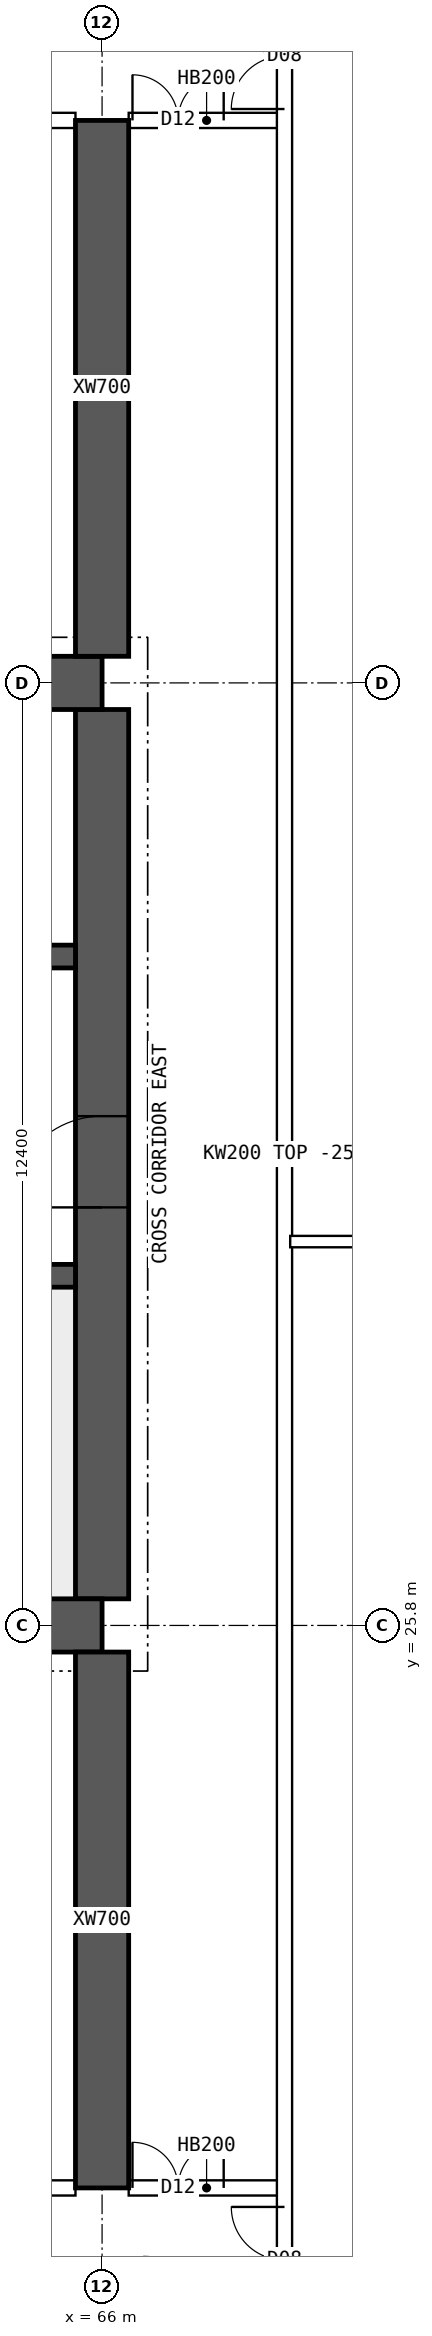
"""IFC4 building model, lengths in metres.
Left out: names, types, materials, properties, quantities, classifications, styles, units other than length and angle.
Written with IfcOpenShell. Run it as: python <this file> out.ifc"""

import sys

from ifc_helpers import new_model, si_unit, direction, frame, frame_2d, origin, place, context, subcontext, project, spatial, polyline, rectangle, outline, extrude, element, fill, save


model = new_model("IFC4")
c1 = context("Model", 3, precision=1e-05, world=origin(), true_north=direction((0.0, 1.0)))
c2 = subcontext(c1, "Body", "Model", "MODEL_VIEW")
j1 = project(units=[si_unit("LENGTHUNIT", "METRE"), si_unit("PLANEANGLEUNIT", "RADIAN")], contexts=[c1])
p1 = place(None, origin())
s1 = spatial("IfcSite", under=j1, at=p1, CompositionType="ELEMENT")
p2 = place(p1, origin())
s2 = spatial("IfcBuilding", under=s1, at=p2, CompositionType="ELEMENT")
p3 = place(p2, frame((0.0, 0.0, 246.55)))
s3 = spatial("IfcBuildingStorey", under=s2, at=p3, CompositionType="ELEMENT", Elevation=246.55)
for number, where, z_axis, x_axis in (
    (1, (18.0, 25.8, 0.0), (0.0, 0.0, 1.0), (1.0, 0.0, 0.0)),
    (2, (18.0, 38.2, 0.0), (0.0, 0.0, 1.0), (1.0, 0.0, 0.0)),
):
    element("IfcWall", number, at=place(p3, frame(where, z_axis=z_axis, x_axis=x_axis)), inside=s3, PredefinedType="SHEAR", context=c2, shape_type="SweptSolid", body=[
        extrude(rectangle(XDim=48.0, YDim=0.7, at=frame_2d((24.0, 0.0))), origin(), (0.0, 0.0, 1.0), 3.75),
    ])
p4 = place(p3, frame((66.0, 26.15, 0.0), z_axis=(0.0, 0.0, 1.0), x_axis=(0.0, 1.0, 0.0)))
e3 = element("IfcWall", 3, at=p4, inside=s3, PredefinedType="SHEAR", context=c2, shape_type="SweptSolid", body=[
    extrude(rectangle(XDim=11.7, YDim=0.7, at=frame_2d((5.85, 0.0))), origin(), (0.0, 0.0, 1.0), 3.75),
])
p5 = place(p4, frame((5.15, 0.0, 0.0)))
e4 = element("IfcOpeningElement", 4, at=p5, cuts=e3, PredefinedType="OPENING", context=c2, shape_type="SweptSolid", body=[
    extrude(rectangle(XDim=1.2, YDim=2.1, at=frame_2d((0.6, 1.05))), frame((0.0, 0.36, 0.0), z_axis=(0.0, -1.0, 0.0), x_axis=(1.0, 0.0, 0.0)), (0.0, 0.0, 1.0), 0.72),
])
p6 = place(p3, frame((18.35, 30.4, 0.0), z_axis=(0.0, 0.0, 1.0), x_axis=(1.0, 0.0, 0.0)))
e5 = element("IfcWall", 5, at=p6, inside=s3, PredefinedType="SHEAR", context=c2, shape_type="SweptSolid", body=[
    extrude(rectangle(XDim=47.3, YDim=0.3, at=frame_2d((23.65, 0.0))), origin(), (0.0, 0.0, 1.0), 3.75),
])
p7 = place(p6, frame((0.4, 0.0, 0.0)))
e6 = element("IfcOpeningElement", 6, at=p7, cuts=e5, PredefinedType="OPENING", context=c2, shape_type="SweptSolid", body=[
    extrude(rectangle(XDim=1.0, YDim=2.1, at=frame_2d((0.5, 1.05))), frame((0.0, 0.16, 0.0), z_axis=(0.0, -1.0, 0.0), x_axis=(1.0, 0.0, 0.0)), (0.0, 0.0, 1.0), 0.32),
])
p8 = place(p6, frame((45.9, 0.0, 0.0)))
e7 = element("IfcOpeningElement", 7, at=p8, cuts=e5, PredefinedType="OPENING", context=c2, shape_type="SweptSolid", body=[
    extrude(rectangle(XDim=1.0, YDim=2.1, at=frame_2d((0.5, 1.05))), frame((0.0, 0.16, 0.0), z_axis=(0.0, -1.0, 0.0), x_axis=(1.0, 0.0, 0.0)), (0.0, 0.0, 1.0), 0.32),
])
p9 = place(p6, frame((8.4, 0.0, 0.0)))
e8 = element("IfcOpeningElement", 8, at=p9, cuts=e5, PredefinedType="OPENING", context=c2, shape_type="SweptSolid", body=[
    extrude(rectangle(XDim=1.1, YDim=2.1, at=frame_2d((0.55, 1.05))), frame((0.0, 0.16, 0.0), z_axis=(0.0, -1.0, 0.0), x_axis=(1.0, 0.0, 0.0)), (0.0, 0.0, 1.0), 0.32),
])
p10 = place(p6, frame((11.0, 0.0, 0.0)))
e9 = element("IfcOpeningElement", 9, at=p10, cuts=e5, PredefinedType="OPENING", context=c2, shape_type="SweptSolid", body=[
    extrude(rectangle(XDim=1.1, YDim=2.1, at=frame_2d((0.55, 1.05))), frame((0.0, 0.16, 0.0), z_axis=(0.0, -1.0, 0.0), x_axis=(1.0, 0.0, 0.0)), (0.0, 0.0, 1.0), 0.32),
])
p11 = place(p6, frame((13.6, 0.0, 0.0)))
e10 = element("IfcOpeningElement", 10, at=p11, cuts=e5, PredefinedType="OPENING", context=c2, shape_type="SweptSolid", body=[
    extrude(rectangle(XDim=1.1, YDim=2.1, at=frame_2d((0.55, 1.05))), frame((0.0, 0.16, 0.0), z_axis=(0.0, -1.0, 0.0), x_axis=(1.0, 0.0, 0.0)), (0.0, 0.0, 1.0), 0.32),
])
p12 = place(p6, frame((16.2, 0.0, 0.0)))
e11 = element("IfcOpeningElement", 11, at=p12, cuts=e5, PredefinedType="OPENING", context=c2, shape_type="SweptSolid", body=[
    extrude(rectangle(XDim=1.1, YDim=2.1, at=frame_2d((0.55, 1.05))), frame((0.0, 0.16, 0.0), z_axis=(0.0, -1.0, 0.0), x_axis=(1.0, 0.0, 0.0)), (0.0, 0.0, 1.0), 0.32),
])
p13 = place(p6, frame((18.975, 0.0, 0.0)))
e12 = element("IfcOpeningElement", 12, at=p13, cuts=e5, PredefinedType="OPENING", context=c2, shape_type="SweptSolid", body=[
    extrude(rectangle(XDim=0.9, YDim=2.1, at=frame_2d((0.45, 1.05))), frame((0.0, 0.16, 0.0), z_axis=(0.0, -1.0, 0.0), x_axis=(1.0, 0.0, 0.0)), (0.0, 0.0, 1.0), 0.32),
])
p14 = place(p6, frame((24.475, 0.0, 0.0)))
e13 = element("IfcOpeningElement", 13, at=p14, cuts=e5, PredefinedType="OPENING", context=c2, shape_type="SweptSolid", body=[
    extrude(rectangle(XDim=0.9, YDim=2.1, at=frame_2d((0.45, 1.05))), frame((0.0, 0.16, 0.0), z_axis=(0.0, -1.0, 0.0), x_axis=(1.0, 0.0, 0.0)), (0.0, 0.0, 1.0), 0.32),
])
p15 = place(p6, frame((30.267, 0.0, 0.0)))
e14 = element("IfcOpeningElement", 14, at=p15, cuts=e5, PredefinedType="OPENING", context=c2, shape_type="SweptSolid", body=[
    extrude(rectangle(XDim=1.1, YDim=2.1, at=frame_2d((0.55, 1.05))), frame((0.0, 0.16, 0.0), z_axis=(0.0, -1.0, 0.0), x_axis=(1.0, 0.0, 0.0)), (0.0, 0.0, 1.0), 0.32),
])
p16 = place(p6, frame((33.8, 0.0, 0.0)))
e15 = element("IfcOpeningElement", 15, at=p16, cuts=e5, PredefinedType="OPENING", context=c2, shape_type="SweptSolid", body=[
    extrude(rectangle(XDim=1.1, YDim=2.1, at=frame_2d((0.55, 1.05))), frame((0.0, 0.16, 0.0), z_axis=(0.0, -1.0, 0.0), x_axis=(1.0, 0.0, 0.0)), (0.0, 0.0, 1.0), 0.32),
])
p17 = place(p6, frame((37.333, 0.0, 0.0)))
e16 = element("IfcOpeningElement", 16, at=p17, cuts=e5, PredefinedType="OPENING", context=c2, shape_type="SweptSolid", body=[
    extrude(rectangle(XDim=1.1, YDim=2.1, at=frame_2d((0.55, 1.05))), frame((0.0, 0.16, 0.0), z_axis=(0.0, -1.0, 0.0), x_axis=(1.0, 0.0, 0.0)), (0.0, 0.0, 1.0), 0.32),
])
p18 = place(p3, frame((18.35, 34.6, 0.0), z_axis=(0.0, 0.0, 1.0), x_axis=(1.0, 0.0, 0.0)))
e17 = element("IfcWall", 17, at=p18, inside=s3, PredefinedType="SHEAR", context=c2, shape_type="SweptSolid", body=[
    extrude(rectangle(XDim=47.3, YDim=0.3, at=frame_2d((23.65, 0.0))), origin(), (0.0, 0.0, 1.0), 3.75),
])
p19 = place(p18, frame((0.9, 0.0, 0.0)))
e18 = element("IfcOpeningElement", 18, at=p19, cuts=e17, PredefinedType="OPENING", context=c2, shape_type="SweptSolid", body=[
    extrude(rectangle(XDim=1.1, YDim=2.1, at=frame_2d((0.55, 1.05))), frame((0.0, 0.16, 0.0), z_axis=(0.0, -1.0, 0.0), x_axis=(1.0, 0.0, 0.0)), (0.0, 0.0, 1.0), 0.32),
])
p20 = place(p18, frame((45.3, 0.0, 0.0)))
e19 = element("IfcOpeningElement", 19, at=p20, cuts=e17, PredefinedType="OPENING", context=c2, shape_type="SweptSolid", body=[
    extrude(rectangle(XDim=1.1, YDim=2.1, at=frame_2d((0.55, 1.05))), frame((0.0, 0.16, 0.0), z_axis=(0.0, -1.0, 0.0), x_axis=(1.0, 0.0, 0.0)), (0.0, 0.0, 1.0), 0.32),
])
p21 = place(p18, frame((4.25, 0.0, 0.0)))
e20 = element("IfcOpeningElement", 20, at=p21, cuts=e17, PredefinedType="OPENING", context=c2, shape_type="SweptSolid", body=[
    extrude(rectangle(XDim=0.9, YDim=2.1, at=frame_2d((0.45, 1.05))), frame((0.0, 0.16, 0.0), z_axis=(0.0, -1.0, 0.0), x_axis=(1.0, 0.0, 0.0)), (0.0, 0.0, 1.0), 0.32),
])
p22 = place(p18, frame((42.15, 0.0, 0.0)))
e21 = element("IfcOpeningElement", 21, at=p22, cuts=e17, PredefinedType="OPENING", context=c2, shape_type="SweptSolid", body=[
    extrude(rectangle(XDim=0.9, YDim=2.1, at=frame_2d((0.45, 1.05))), frame((0.0, 0.16, 0.0), z_axis=(0.0, -1.0, 0.0), x_axis=(1.0, 0.0, 0.0)), (0.0, 0.0, 1.0), 0.32),
])
p23 = place(p18, frame((9.025, 0.0, 0.0)))
e22 = element("IfcOpeningElement", 22, at=p23, cuts=e17, PredefinedType="OPENING", context=c2, shape_type="SweptSolid", body=[
    extrude(rectangle(XDim=0.9, YDim=2.1, at=frame_2d((0.45, 1.05))), frame((0.0, 0.16, 0.0), z_axis=(0.0, -1.0, 0.0), x_axis=(1.0, 0.0, 0.0)), (0.0, 0.0, 1.0), 0.32),
])
p24 = place(p18, frame((12.999, 0.0, 0.0)))
e23 = element("IfcOpeningElement", 23, at=p24, cuts=e17, PredefinedType="OPENING", context=c2, shape_type="SweptSolid", body=[
    extrude(rectangle(XDim=0.9, YDim=2.1, at=frame_2d((0.45, 1.05))), frame((0.0, 0.16, 0.0), z_axis=(0.0, -1.0, 0.0), x_axis=(1.0, 0.0, 0.0)), (0.0, 0.0, 1.0), 0.32),
])
p25 = place(p18, frame((16.646, 0.0, 0.0)))
e24 = element("IfcOpeningElement", 24, at=p25, cuts=e17, PredefinedType="OPENING", context=c2, shape_type="SweptSolid", body=[
    extrude(rectangle(XDim=0.9, YDim=2.1, at=frame_2d((0.45, 1.05))), frame((0.0, 0.16, 0.0), z_axis=(0.0, -1.0, 0.0), x_axis=(1.0, 0.0, 0.0)), (0.0, 0.0, 1.0), 0.32),
])
p26 = place(p18, frame((20.405, 0.0, 0.0)))
e25 = element("IfcOpeningElement", 25, at=p26, cuts=e17, PredefinedType="OPENING", context=c2, shape_type="SweptSolid", body=[
    extrude(rectangle(XDim=0.9, YDim=2.1, at=frame_2d((0.45, 1.05))), frame((0.0, 0.16, 0.0), z_axis=(0.0, -1.0, 0.0), x_axis=(1.0, 0.0, 0.0)), (0.0, 0.0, 1.0), 0.32),
])
p27 = place(p18, frame((24.811, 0.0, 0.0)))
e26 = element("IfcOpeningElement", 26, at=p27, cuts=e17, PredefinedType="OPENING", context=c2, shape_type="SweptSolid", body=[
    extrude(rectangle(XDim=0.9, YDim=2.1, at=frame_2d((0.45, 1.05))), frame((0.0, 0.16, 0.0), z_axis=(0.0, -1.0, 0.0), x_axis=(1.0, 0.0, 0.0)), (0.0, 0.0, 1.0), 0.32),
])
p28 = place(p18, frame((27.608, 0.0, 0.0)))
e27 = element("IfcOpeningElement", 27, at=p28, cuts=e17, PredefinedType="OPENING", context=c2, shape_type="SweptSolid", body=[
    extrude(rectangle(XDim=0.9, YDim=2.1, at=frame_2d((0.45, 1.05))), frame((0.0, 0.16, 0.0), z_axis=(0.0, -1.0, 0.0), x_axis=(1.0, 0.0, 0.0)), (0.0, 0.0, 1.0), 0.32),
])
p29 = place(p18, frame((29.778, 0.0, 0.0)))
e28 = element("IfcOpeningElement", 28, at=p29, cuts=e17, PredefinedType="OPENING", context=c2, shape_type="SweptSolid", body=[
    extrude(rectangle(XDim=0.9, YDim=2.1, at=frame_2d((0.45, 1.05))), frame((0.0, 0.16, 0.0), z_axis=(0.0, -1.0, 0.0), x_axis=(1.0, 0.0, 0.0)), (0.0, 0.0, 1.0), 0.32),
])
p30 = place(p18, frame((33.577, 0.0, 0.0)))
e29 = element("IfcOpeningElement", 29, at=p30, cuts=e17, PredefinedType="OPENING", context=c2, shape_type="SweptSolid", body=[
    extrude(rectangle(XDim=0.9, YDim=2.1, at=frame_2d((0.45, 1.05))), frame((0.0, 0.16, 0.0), z_axis=(0.0, -1.0, 0.0), x_axis=(1.0, 0.0, 0.0)), (0.0, 0.0, 1.0), 0.32),
])
p31 = place(p18, frame((37.528, 0.0, 0.0)))
e30 = element("IfcOpeningElement", 30, at=p31, cuts=e17, PredefinedType="OPENING", context=c2, shape_type="SweptSolid", body=[
    extrude(rectangle(XDim=0.9, YDim=2.1, at=frame_2d((0.45, 1.05))), frame((0.0, 0.16, 0.0), z_axis=(0.0, -1.0, 0.0), x_axis=(1.0, 0.0, 0.0)), (0.0, 0.0, 1.0), 0.32),
])
for number, where, z_axis, x_axis in (
    (31, (66.0, 18.4, 0.0), (0.0, 0.0, 1.0), (0.0, 1.0, 0.0)),
    (32, (66.0, 38.55, 0.0), (0.0, 0.0, 1.0), (0.0, 1.0, 0.0)),
):
    element("IfcWall", number, at=place(p3, frame(where, z_axis=z_axis, x_axis=x_axis)), inside=s3, PredefinedType="SHEAR", context=c2, shape_type="SweptSolid", body=[
        extrude(rectangle(XDim=7.05, YDim=0.7, at=frame_2d((3.525, 0.0))), origin(), (0.0, 0.0, 1.0), 3.75),
    ])
p32 = place(p3, frame((60.35, 18.4, 0.0), z_axis=(0.0, 0.0, 1.0), x_axis=(1.0, 0.0, 0.0)))
e33 = element("IfcWall", 33, at=p32, inside=s3, PredefinedType="SOLIDWALL", context=c2, shape_type="SweptSolid", body=[
    extrude(rectangle(XDim=5.3, YDim=0.2, at=frame_2d((2.65, 0.0))), origin(), (0.0, 0.0, 1.0), 3.5),
])
p33 = place(p32, frame((0.525, 0.0, 0.0)))
e34 = element("IfcOpeningElement", 34, at=p33, cuts=e33, PredefinedType="OPENING", context=c2, shape_type="SweptSolid", body=[
    extrude(rectangle(XDim=1.0, YDim=2.1, at=frame_2d((0.5, 1.05))), frame((0.0, 0.11, 0.0), z_axis=(0.0, -1.0, 0.0), x_axis=(1.0, 0.0, 0.0)), (0.0, 0.0, 1.0), 0.22),
])
p34 = place(p3, frame((66.35, 18.4, 0.0), z_axis=(0.0, 0.0, 1.0), x_axis=(1.0, 0.0, 0.0)))
e35 = element("IfcWall", 35, at=p34, inside=s3, PredefinedType="SOLIDWALL", context=c2, shape_type="SweptSolid", body=[
    extrude(rectangle(XDim=2.05, YDim=0.2, at=frame_2d((1.025, 0.0))), origin(), (0.0, 0.0, 1.0), 3.5),
])
p35 = place(p34, frame((0.05, 0.0, 0.0)))
e36 = element("IfcOpeningElement", 36, at=p35, cuts=e35, PredefinedType="OPENING", context=c2, shape_type="SweptSolid", body=[
    extrude(rectangle(XDim=1.2, YDim=2.1, at=frame_2d((0.6, 1.05))), frame((0.0, 0.11, 0.0), z_axis=(0.0, -1.0, 0.0), x_axis=(1.0, 0.0, 0.0)), (0.0, 0.0, 1.0), 0.22),
])
p36 = place(p3, frame((60.35, 45.6, 0.0), z_axis=(0.0, 0.0, 1.0), x_axis=(1.0, 0.0, 0.0)))
e37 = element("IfcWall", 37, at=p36, inside=s3, PredefinedType="SOLIDWALL", context=c2, shape_type="SweptSolid", body=[
    extrude(rectangle(XDim=5.3, YDim=0.2, at=frame_2d((2.65, 0.0))), origin(), (0.0, 0.0, 1.0), 3.5),
])
p37 = place(p36, frame((0.525, 0.0, 0.0)))
e38 = element("IfcOpeningElement", 38, at=p37, cuts=e37, PredefinedType="OPENING", context=c2, shape_type="SweptSolid", body=[
    extrude(rectangle(XDim=1.0, YDim=2.1, at=frame_2d((0.5, 1.05))), frame((0.0, 0.11, 0.0), z_axis=(0.0, -1.0, 0.0), x_axis=(1.0, 0.0, 0.0)), (0.0, 0.0, 1.0), 0.22),
])
p38 = place(p3, frame((66.35, 45.6, 0.0), z_axis=(0.0, 0.0, 1.0), x_axis=(1.0, 0.0, 0.0)))
e39 = element("IfcWall", 39, at=p38, inside=s3, PredefinedType="SOLIDWALL", context=c2, shape_type="SweptSolid", body=[
    extrude(rectangle(XDim=2.05, YDim=0.2, at=frame_2d((1.025, 0.0))), origin(), (0.0, 0.0, 1.0), 3.5),
])
p39 = place(p38, frame((0.05, 0.0, 0.0)))
e40 = element("IfcOpeningElement", 40, at=p39, cuts=e39, PredefinedType="OPENING", context=c2, shape_type="SweptSolid", body=[
    extrude(rectangle(XDim=1.2, YDim=2.1, at=frame_2d((0.6, 1.05))), frame((0.0, 0.11, 0.0), z_axis=(0.0, -1.0, 0.0), x_axis=(1.0, 0.0, 0.0)), (0.0, 0.0, 1.0), 0.22),
])
p40 = place(p3, frame((68.475, 30.85, 0.0), z_axis=(0.0, 0.0, 1.0), x_axis=(1.0, 0.0, 0.0)))
e41 = element("IfcWall", 41, at=p40, inside=s3, PredefinedType="PARTITIONING", context=c2, shape_type="SweptSolid", body=[
    extrude(outline(polyline([(0.0, 0.0), (6.82, 0.0), (6.82, 3.5), (3.827, 3.5), (3.825, 3.05), (3.227, 3.05), (3.225, 3.5), (0.0, 3.5), (0.0, 0.0)])), frame((0.0, 0.075, 0.0), z_axis=(0.0, -1.0, 0.0), x_axis=(1.0, 0.0, 0.0)), (0.0, 0.0, 1.0), 0.15),
])
p41 = place(p3, frame((68.4, 11.646, 0.0), z_axis=(0.0, 0.0, 1.0), x_axis=(0.0, 1.0, 0.0)))
e42 = element("IfcWall", 42, at=p41, inside=s3, PredefinedType="SOLIDWALL", context=c2, shape_type="SweptSolid", body=[
    extrude(rectangle(XDim=40.708, YDim=0.2, at=frame_2d((20.354, 0.0))), origin(), (0.0, 0.0, 1.0), 3.5),
])
p42 = place(p41, frame((5.104, 0.0, 0.0)))
e43 = element("IfcOpeningElement", 43, at=p42, cuts=e42, PredefinedType="OPENING", context=c2, shape_type="SweptSolid", body=[
    extrude(rectangle(XDim=1.4, YDim=2.1, at=frame_2d((0.7, 1.05))), frame((0.0, 0.11, 0.0), z_axis=(0.0, -1.0, 0.0), x_axis=(1.0, 0.0, 0.0)), (0.0, 0.0, 1.0), 0.22),
])
p43 = place(p41, frame((34.104, 0.0, 0.0)))
e44 = element("IfcOpeningElement", 44, at=p43, cuts=e42, PredefinedType="OPENING", context=c2, shape_type="SweptSolid", body=[
    extrude(rectangle(XDim=1.4, YDim=2.1, at=frame_2d((0.7, 1.05))), frame((0.0, 0.11, 0.0), z_axis=(0.0, -1.0, 0.0), x_axis=(1.0, 0.0, 0.0)), (0.0, 0.0, 1.0), 0.22),
])
p44 = place(p5, origin())
e45 = element("IfcDoor", 45, at=p44, inside=s3, OperationType="SINGLE_SWING_LEFT", PredefinedType="DOOR", context=c2, shape_type="SweptSolid", body=[
    extrude(rectangle(XDim=1.2, YDim=2.1, at=frame_2d((0.6, 1.05))), frame((0.0, 0.025, 0.0), z_axis=(0.0, -1.0, 0.0), x_axis=(1.0, 0.0, 0.0)), (0.0, 0.0, 1.0), 0.05),
])
fill(e4, e45)
p45 = place(p35, origin())
e46 = element("IfcDoor", 46, at=p45, inside=s3, OperationType="DOUBLE_DOOR_SINGLE_SWING", PredefinedType="DOOR", context=c2, shape_type="SweptSolid", body=[
    extrude(rectangle(XDim=1.2, YDim=2.1, at=frame_2d((0.6, 1.05))), frame((0.0, 0.025, 0.0), z_axis=(0.0, -1.0, 0.0), x_axis=(1.0, 0.0, 0.0)), (0.0, 0.0, 1.0), 0.05),
])
fill(e36, e46)
p46 = place(p39, origin())
e47 = element("IfcDoor", 47, at=p46, inside=s3, OperationType="DOUBLE_DOOR_SINGLE_SWING", PredefinedType="DOOR", context=c2, shape_type="SweptSolid", body=[
    extrude(rectangle(XDim=1.2, YDim=2.1, at=frame_2d((0.6, 1.05))), frame((0.0, 0.025, 0.0), z_axis=(0.0, -1.0, 0.0), x_axis=(1.0, 0.0, 0.0)), (0.0, 0.0, 1.0), 0.05),
])
fill(e40, e47)
p47 = place(p42, origin())
e48 = element("IfcDoor", 48, at=p47, inside=s3, OperationType="DOUBLE_DOOR_SINGLE_SWING", PredefinedType="DOOR", context=c2, shape_type="SweptSolid", body=[
    extrude(rectangle(XDim=1.4, YDim=2.1, at=frame_2d((0.7, 1.05))), frame((0.0, 0.025, 0.0), z_axis=(0.0, -1.0, 0.0), x_axis=(1.0, 0.0, 0.0)), (0.0, 0.0, 1.0), 0.05),
])
fill(e43, e48)
p48 = place(p43, origin())
e49 = element("IfcDoor", 49, at=p48, inside=s3, OperationType="DOUBLE_DOOR_SINGLE_SWING", PredefinedType="DOOR", context=c2, shape_type="SweptSolid", body=[
    extrude(rectangle(XDim=1.4, YDim=2.1, at=frame_2d((0.7, 1.05))), frame((0.0, 0.025, 0.0), z_axis=(0.0, -1.0, 0.0), x_axis=(1.0, 0.0, 0.0)), (0.0, 0.0, 1.0), 0.05),
])
fill(e44, e49)
save(model, sys.argv[1])
